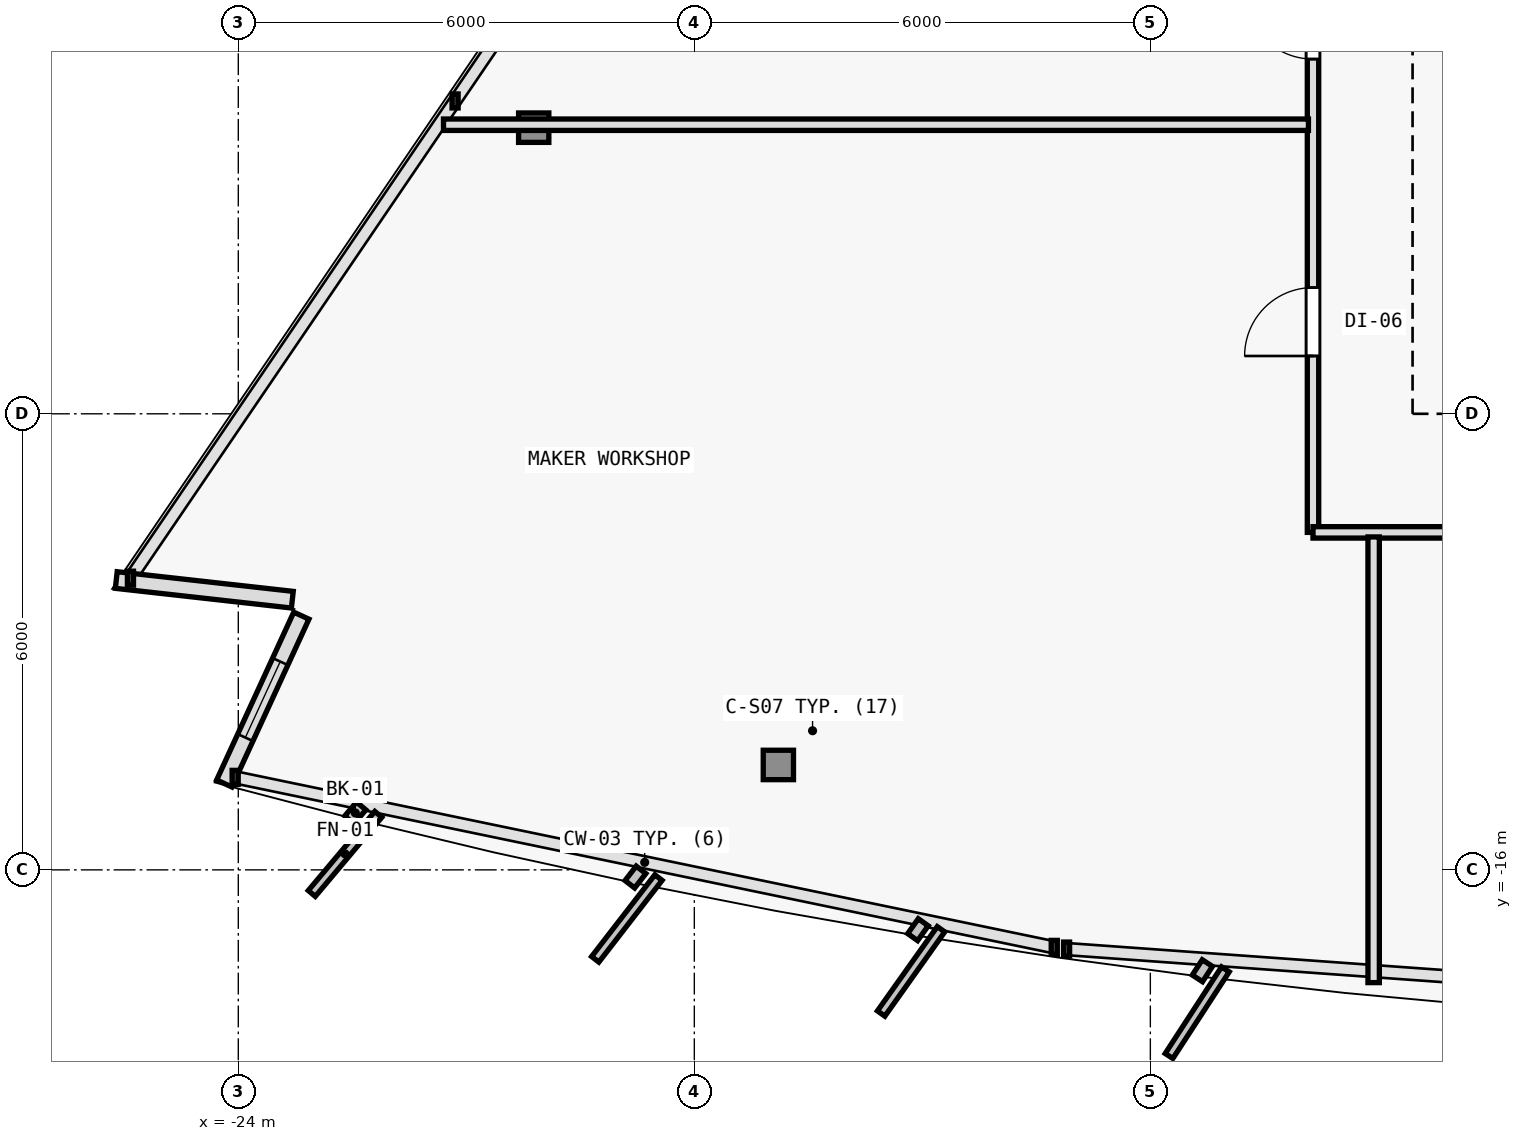
"""IFC4 building model, lengths in metres.
Left out: names, types, materials, properties, quantities, classifications, styles, units other than length and angle.
Written with IfcOpenShell. Run it as: python <this file> out.ifc"""

import sys

from ifc_helpers import new_model, si_unit, direction, frame, frame_2d, origin, origin_2d, place, context, subcontext, project, spatial, rectangle, i_section, extrude, element, fill, save


model = new_model("IFC4")
c1 = context("Model", 3, precision=1e-05, world=origin(), true_north=direction((0.0, 1.0)))
c2 = subcontext(c1, "Body", "Model", "MODEL_VIEW")
j1 = project(units=[si_unit("LENGTHUNIT", "METRE"), si_unit("PLANEANGLEUNIT", "RADIAN")], contexts=[c1])
p1 = place(None, origin())
s1 = spatial("IfcSite", under=j1, at=p1, CompositionType="ELEMENT")
p2 = place(p1, origin())
s2 = spatial("IfcBuilding", under=s1, at=p2, CompositionType="ELEMENT")
p3 = place(p2, frame((0.0, 0.0, 201.9)))
s3 = spatial("IfcBuildingStorey", under=s2, at=p3, CompositionType="ELEMENT", Elevation=201.9)
p4 = place(p3, frame((-16.894, -14.62, 0.006), z_axis=(0.020596339702, 0.033443561496, 0.99922836178), x_axis=(-0.851480003019, 0.52438707503, 0.0)))
e1 = element("IfcColumn", 1, at=p4, inside=s3, PredefinedType="COLUMN", context=c2, shape_type="SweptSolid", body=[
    extrude(i_section(OverallWidth=0.398, OverallDepth=0.387, WebThickness=0.013, FlangeThickness=0.022, FilletRadius=0.015, at=origin_2d()), origin(), (0.0, 0.0, 1.0), 3.592),
])
p5 = place(p3, frame((-20.113, -6.236, 0.006), z_axis=(0.025224163578, 0.021620711639, 0.999447990843), x_axis=(-0.650791373456, 0.759256602365, 0.0)))
e2 = element("IfcColumn", 2, at=p5, inside=s3, PredefinedType="COLUMN", context=c2, shape_type="SweptSolid", body=[
    extrude(i_section(OverallWidth=0.398, OverallDepth=0.387, WebThickness=0.013, FlangeThickness=0.022, FilletRadius=0.015, at=origin_2d()), origin(), (0.0, 0.0, 1.0), 3.591),
])
p6 = place(p3, frame((-23.289, -12.446, 0.0), z_axis=(0.0, 0.0, 1.0), x_axis=(-0.993829972675, 0.110914315635, 0.0)))
e3 = element("IfcWall", 3, at=p6, inside=s3, PredefinedType="SOLIDWALL", context=c2, shape_type="SweptSolid", body=[
    extrude(rectangle(XDim=2.331, YDim=0.22, at=frame_2d((1.166, 0.0))), origin(), (0.0, 0.0, 1.0), 3.35),
])
p7 = place(p3, frame((-24.185, -14.863, 0.0), z_axis=(0.0, 0.0, 1.0), x_axis=(0.417509141111, 0.90867272276, 0.0)))
e4 = element("IfcWall", 4, at=p7, inside=s3, PredefinedType="SOLIDWALL", context=c2, shape_type="SweptSolid", body=[
    extrude(rectangle(XDim=2.43, YDim=0.22, at=frame_2d((1.215, 0.0))), origin(), (0.0, 0.0, 1.0), 3.35),
])
p8 = place(p7, frame((0.665, 0.0, 0.62)))
e5 = element("IfcOpeningElement", 5, at=p8, cuts=e4, PredefinedType="OPENING", context=c2, shape_type="SweptSolid", body=[
    extrude(rectangle(XDim=1.1, YDim=1.8, at=frame_2d((0.55, 0.9))), frame((0.0, 0.12, 0.0), z_axis=(0.0, -1.0, 0.0), x_axis=(1.0, 0.0, 0.0)), (0.0, 0.0, 1.0), 0.24),
])
p9 = place(p3, frame((-9.86, -11.56, 0.0), z_axis=(0.0, 0.0, 1.0), x_axis=(0.0, 1.0, 0.0)))
e6 = element("IfcWall", 6, at=p9, inside=s3, PredefinedType="PARTITIONING", context=c2, shape_type="SweptSolid", body=[
    extrude(rectangle(XDim=19.986, YDim=0.15, at=frame_2d((9.993, 0.0))), origin(), (0.0, 0.0, 1.0), 2.775),
])
p10 = place(p9, frame((11.041, 0.0, 0.0)))
e7 = element("IfcOpeningElement", 7, at=p10, cuts=e6, PredefinedType="OPENING", context=c2, shape_type="SweptSolid", body=[
    extrude(rectangle(XDim=0.9, YDim=2.1, at=frame_2d((0.45, 1.05))), frame((0.0, 0.085, 0.0), z_axis=(0.0, -1.0, 0.0), x_axis=(1.0, 0.0, 0.0)), (0.0, 0.0, 1.0), 0.17),
])
p11 = place(p9, frame((8.766, 0.0, 0.0)))
e8 = element("IfcOpeningElement", 8, at=p11, cuts=e6, PredefinedType="OPENING", context=c2, shape_type="SweptSolid", body=[
    extrude(rectangle(XDim=0.9, YDim=2.1, at=frame_2d((0.45, 1.05))), frame((0.0, 0.085, 0.0), z_axis=(0.0, -1.0, 0.0), x_axis=(1.0, 0.0, 0.0)), (0.0, 0.0, 1.0), 0.17),
])
p12 = place(p9, frame((6.227, 0.0, 0.0)))
e9 = element("IfcOpeningElement", 9, at=p12, cuts=e6, PredefinedType="OPENING", context=c2, shape_type="SweptSolid", body=[
    extrude(rectangle(XDim=0.9, YDim=2.1, at=frame_2d((0.45, 1.05))), frame((0.0, 0.085, 0.0), z_axis=(0.0, -1.0, 0.0), x_axis=(1.0, 0.0, 0.0)), (0.0, 0.0, 1.0), 0.17),
])
p13 = place(p9, frame((2.321, 0.0, 0.0)))
e10 = element("IfcOpeningElement", 10, at=p13, cuts=e6, PredefinedType="OPENING", context=c2, shape_type="SweptSolid", body=[
    extrude(rectangle(XDim=0.9, YDim=2.1, at=frame_2d((0.45, 1.05))), frame((0.0, 0.085, 0.0), z_axis=(0.0, -1.0, 0.0), x_axis=(1.0, 0.0, 0.0)), (0.0, 0.0, 1.0), 0.17),
])
p14 = place(p9, frame((13.492, 0.0, 0.0)))
e11 = element("IfcOpeningElement", 11, at=p14, cuts=e6, PredefinedType="OPENING", context=c2, shape_type="SweptSolid", body=[
    extrude(rectangle(XDim=0.9, YDim=2.1, at=frame_2d((0.45, 1.05))), frame((0.0, 0.085, 0.0), z_axis=(0.0, -1.0, 0.0), x_axis=(1.0, 0.0, 0.0)), (0.0, 0.0, 1.0), 0.17),
])
p15 = place(p3, frame((13.18, -11.56, 0.0), z_axis=(0.0, 0.0, 1.0), x_axis=(-1.0, 0.0, 0.0)))
e12 = element("IfcWall", 12, at=p15, inside=s3, PredefinedType="PARTITIONING", context=c2, shape_type="SweptSolid", body=[
    extrude(rectangle(XDim=23.04, YDim=0.15, at=frame_2d((11.52, 0.0))), origin(), (0.0, 0.0, 1.0), 2.775),
])
p16 = place(p15, frame((14.436, 0.0, 0.0)))
e13 = element("IfcOpeningElement", 13, at=p16, cuts=e12, PredefinedType="OPENING", context=c2, shape_type="SweptSolid", body=[
    extrude(rectangle(XDim=0.9, YDim=2.1, at=frame_2d((0.45, 1.05))), frame((0.0, 0.085, 0.0), z_axis=(0.0, -1.0, 0.0), x_axis=(1.0, 0.0, 0.0)), (0.0, 0.0, 1.0), 0.17),
])
p17 = place(p15, frame((5.938, 0.0, 0.0)))
e14 = element("IfcOpeningElement", 14, at=p17, cuts=e12, PredefinedType="OPENING", context=c2, shape_type="SweptSolid", body=[
    extrude(rectangle(XDim=0.9, YDim=2.1, at=frame_2d((0.45, 1.05))), frame((0.0, 0.085, 0.0), z_axis=(0.0, -1.0, 0.0), x_axis=(1.0, 0.0, 0.0)), (0.0, 0.0, 1.0), 0.17),
])
p18 = place(p15, frame((3.458, 0.0, 0.0)))
e15 = element("IfcOpeningElement", 15, at=p18, cuts=e12, PredefinedType="OPENING", context=c2, shape_type="SweptSolid", body=[
    extrude(rectangle(XDim=0.9, YDim=2.1, at=frame_2d((0.45, 1.05))), frame((0.0, 0.085, 0.0), z_axis=(0.0, -1.0, 0.0), x_axis=(1.0, 0.0, 0.0)), (0.0, 0.0, 1.0), 0.17),
])
p19 = place(p15, frame((0.925, 0.0, 0.0)))
e16 = element("IfcOpeningElement", 16, at=p19, cuts=e12, PredefinedType="OPENING", context=c2, shape_type="SweptSolid", body=[
    extrude(rectangle(XDim=0.9, YDim=2.1, at=frame_2d((0.45, 1.05))), frame((0.0, 0.085, 0.0), z_axis=(0.0, -1.0, 0.0), x_axis=(1.0, 0.0, 0.0)), (0.0, 0.0, 1.0), 0.17),
])
p20 = place(p3, frame((-9.92, -6.197, 0.0), z_axis=(0.0, 0.0, 1.0), x_axis=(-1.0, 0.0, 0.0)))
e17 = element("IfcWall", 17, at=p20, inside=s3, PredefinedType="PARTITIONING", context=c2, shape_type="SweptSolid", body=[
    extrude(rectangle(XDim=11.38, YDim=0.15, at=frame_2d((5.69, 0.0))), origin(), (0.0, 0.0, 1.0), 2.725),
])
p21 = place(p3, frame((-9.062, -11.62, 0.0), z_axis=(0.0, 0.0, 1.0), x_axis=(0.0, -1.0, 0.0)))
e18 = element("IfcWall", 18, at=p21, inside=s3, PredefinedType="PARTITIONING", context=c2, shape_type="SweptSolid", body=[
    extrude(rectangle(XDim=5.863, YDim=0.15, at=frame_2d((2.932, 0.0))), origin(), (0.0, 0.0, 1.0), 2.725),
])
p22 = place(p8, origin())
e19 = element("IfcWindow", 19, at=p22, inside=s3, PartitioningType="SINGLE_PANEL", PredefinedType="WINDOW", context=c2, shape_type="SweptSolid", body=[
    extrude(rectangle(XDim=1.1, YDim=1.8, at=frame_2d((0.55, 0.9))), frame((0.0, 0.03, 0.0), z_axis=(0.0, -1.0, 0.0), x_axis=(1.0, 0.0, 0.0)), (0.0, 0.0, 1.0), 0.06),
])
fill(e5, e19)
p23 = place(p12, origin())
e20 = element("IfcDoor", 20, at=p23, inside=s3, OperationType="SINGLE_SWING_RIGHT", PredefinedType="DOOR", context=c2, shape_type="SweptSolid", body=[
    extrude(rectangle(XDim=0.9, YDim=2.1, at=frame_2d((0.45, 1.05))), frame((0.0, 0.025, 0.0), z_axis=(0.0, -1.0, 0.0), x_axis=(1.0, 0.0, 0.0)), (0.0, 0.0, 1.0), 0.05),
])
fill(e9, e20)
p24 = place(p13, origin())
e21 = element("IfcDoor", 21, at=p24, inside=s3, OperationType="SINGLE_SWING_LEFT", PredefinedType="DOOR", context=c2, shape_type="SweptSolid", body=[
    extrude(rectangle(XDim=0.9, YDim=2.1, at=frame_2d((0.45, 1.05))), frame((0.0, 0.025, 0.0), z_axis=(0.0, -1.0, 0.0), x_axis=(1.0, 0.0, 0.0)), (0.0, 0.0, 1.0), 0.05),
])
fill(e10, e21)
save(model, sys.argv[1])
